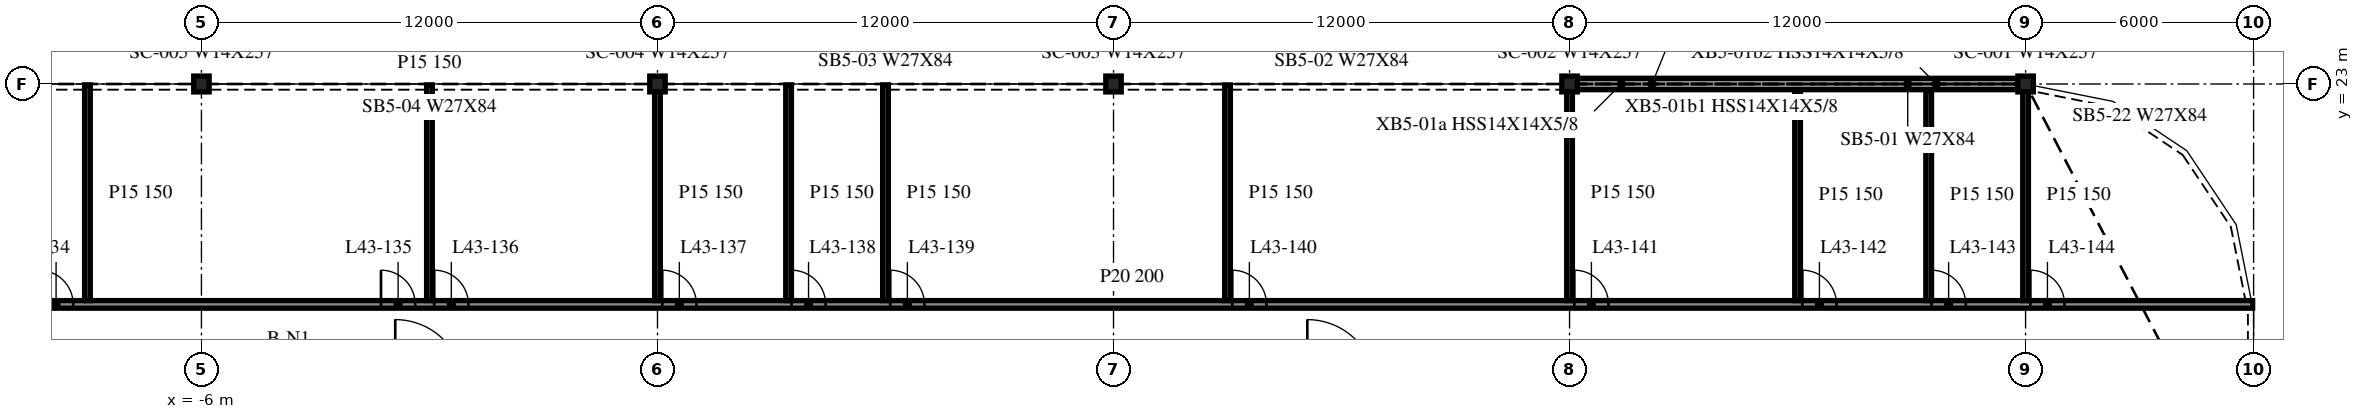
"""IFC4 building model, lengths in metres.
Left out: names, types, materials, properties, quantities, classifications, styles, units other than length and angle.
Written with IfcOpenShell. Run it as: python <this file> out.ifc"""

import sys

from ifc_helpers import new_model, si_unit, direction, frame, frame_2d, origin, origin_2d, place, context, subcontext, project, spatial, rectangle, i_section, extrude, element, fill, save


model = new_model("IFC4")
c1 = context("Model", 3, precision=1e-05, world=origin(), true_north=direction((0.0, 1.0)))
c2 = subcontext(c1, "Body", "Model", "MODEL_VIEW")
j1 = project(units=[si_unit("LENGTHUNIT", "METRE"), si_unit("PLANEANGLEUNIT", "RADIAN")], contexts=[c1])
p1 = place(None, origin())
s1 = spatial("IfcSite", under=j1, at=p1, CompositionType="ELEMENT")
p2 = place(p1, origin())
s2 = spatial("IfcBuilding", under=s1, at=p2, CompositionType="ELEMENT")
p3 = place(p2, frame((0.0, 0.0, 182.0)))
s3 = spatial("IfcBuildingStorey", under=s2, at=p3, CompositionType="ELEMENT", Elevation=182.0)
for number, where, z_axis, x_axis in (
    (1, (42.0, 23.0, -0.34), (0.0, 0.0, 1.0), (1.0, 0.0, 0.0)),
    (2, (30.0, 23.0, -0.34), (0.0, 0.0, 1.0), (1.0, 0.0, 0.0)),
    (3, (18.0, 23.0, -0.34), (0.0, 0.0, 1.0), (1.0, 0.0, 0.0)),
    (4, (6.0, 23.0, -0.34), (0.0, 0.0, 1.0), (1.0, 0.0, 0.0)),
    (5, (-6.0, 23.0, -0.34), (0.0, 0.0, 1.0), (1.0, 0.0, 0.0)),
):
    element("IfcColumn", number, at=place(p3, frame(where, z_axis=z_axis, x_axis=x_axis)), inside=s3, PredefinedType="COLUMN", context=c2, shape_type="SweptSolid", body=[
        extrude(i_section(OverallWidth=0.406, OverallDepth=0.417, WebThickness=0.03, FlangeThickness=0.048, at=origin_2d()), origin(), (0.0, 0.0, 1.0), 3.8),
    ])
p4 = place(p3, frame((41.985, 23.0, 0.0), z_axis=(0.0, 0.0, 1.0), x_axis=(-1.0, 0.0, 0.0)))
e6 = element("IfcWall", 6, at=p4, inside=s3, PredefinedType="NOTDEFINED", context=c2, shape_type="SweptSolid", body=[
    extrude(rectangle(XDim=11.97, YDim=0.3, at=frame_2d((5.985, 0.0))), origin(), (0.0, 0.0, 1.0), 2.782),
])
p5 = place(p3, frame((-47.975, 17.2, 0.0), z_axis=(0.0, 0.0, 1.0), x_axis=(1.0, 0.0, 0.0)))
e7 = element("IfcWall", 7, at=p5, inside=s3, PredefinedType="PARTITIONING", context=c2, shape_type="SweptSolid", body=[
    extrude(rectangle(XDim=95.95, YDim=0.2, at=frame_2d((47.975, 0.0))), origin(), (0.0, 0.0, 1.0), 3.46),
])
p6 = place(p5, frame((7.7, 0.0, 0.0)))
e8 = element("IfcOpeningElement", 8, at=p6, cuts=e7, PredefinedType="OPENING", context=c2, shape_type="SweptSolid", body=[
    extrude(rectangle(XDim=0.9, YDim=2.1, at=frame_2d((0.45, 1.05))), frame((0.0, 0.11, 0.0), z_axis=(0.0, -1.0, 0.0), x_axis=(1.0, 0.0, 0.0)), (0.0, 0.0, 1.0), 0.22),
])
p7 = place(p5, frame((16.7, 0.0, 0.0)))
e9 = element("IfcOpeningElement", 9, at=p7, cuts=e7, PredefinedType="OPENING", context=c2, shape_type="SweptSolid", body=[
    extrude(rectangle(XDim=0.9, YDim=2.1, at=frame_2d((0.45, 1.05))), frame((0.0, 0.11, 0.0), z_axis=(0.0, -1.0, 0.0), x_axis=(1.0, 0.0, 0.0)), (0.0, 0.0, 1.0), 0.22),
])
p8 = place(p5, frame((22.7, 0.0, 0.0)))
e10 = element("IfcOpeningElement", 10, at=p8, cuts=e7, PredefinedType="OPENING", context=c2, shape_type="SweptSolid", body=[
    extrude(rectangle(XDim=0.9, YDim=2.1, at=frame_2d((0.45, 1.05))), frame((0.0, 0.11, 0.0), z_axis=(0.0, -1.0, 0.0), x_axis=(1.0, 0.0, 0.0)), (0.0, 0.0, 1.0), 0.22),
])
p9 = place(p5, frame((26.1, 0.0, 0.0)))
e11 = element("IfcOpeningElement", 11, at=p9, cuts=e7, PredefinedType="OPENING", context=c2, shape_type="SweptSolid", body=[
    extrude(rectangle(XDim=0.9, YDim=2.1, at=frame_2d((0.45, 1.05))), frame((0.0, 0.11, 0.0), z_axis=(0.0, -1.0, 0.0), x_axis=(1.0, 0.0, 0.0)), (0.0, 0.0, 1.0), 0.22),
])
p10 = place(p5, frame((28.7, 0.0, 0.0)))
e12 = element("IfcOpeningElement", 12, at=p10, cuts=e7, PredefinedType="OPENING", context=c2, shape_type="SweptSolid", body=[
    extrude(rectangle(XDim=0.9, YDim=2.1, at=frame_2d((0.45, 1.05))), frame((0.0, 0.11, 0.0), z_axis=(0.0, -1.0, 0.0), x_axis=(1.0, 0.0, 0.0)), (0.0, 0.0, 1.0), 0.22),
])
p11 = place(p5, frame((37.7, 0.0, 0.0)))
e13 = element("IfcOpeningElement", 13, at=p11, cuts=e7, PredefinedType="OPENING", context=c2, shape_type="SweptSolid", body=[
    extrude(rectangle(XDim=0.9, YDim=2.1, at=frame_2d((0.45, 1.05))), frame((0.0, 0.11, 0.0), z_axis=(0.0, -1.0, 0.0), x_axis=(1.0, 0.0, 0.0)), (0.0, 0.0, 1.0), 0.22),
])
p12 = place(p5, frame((46.7, 0.0, 0.0)))
e14 = element("IfcOpeningElement", 14, at=p12, cuts=e7, PredefinedType="OPENING", context=c2, shape_type="SweptSolid", body=[
    extrude(rectangle(XDim=0.9, YDim=2.1, at=frame_2d((0.45, 1.05))), frame((0.0, 0.11, 0.0), z_axis=(0.0, -1.0, 0.0), x_axis=(1.0, 0.0, 0.0)), (0.0, 0.0, 1.0), 0.22),
])
p13 = place(p5, frame((48.1, 0.0, 0.0)))
e15 = element("IfcOpeningElement", 15, at=p13, cuts=e7, PredefinedType="OPENING", context=c2, shape_type="SweptSolid", body=[
    extrude(rectangle(XDim=0.9, YDim=2.1, at=frame_2d((0.45, 1.05))), frame((0.0, 0.11, 0.0), z_axis=(0.0, -1.0, 0.0), x_axis=(1.0, 0.0, 0.0)), (0.0, 0.0, 1.0), 0.22),
])
p14 = place(p5, frame((54.1, 0.0, 0.0)))
e16 = element("IfcOpeningElement", 16, at=p14, cuts=e7, PredefinedType="OPENING", context=c2, shape_type="SweptSolid", body=[
    extrude(rectangle(XDim=0.9, YDim=2.1, at=frame_2d((0.45, 1.05))), frame((0.0, 0.11, 0.0), z_axis=(0.0, -1.0, 0.0), x_axis=(1.0, 0.0, 0.0)), (0.0, 0.0, 1.0), 0.22),
])
p15 = place(p5, frame((57.5, 0.0, 0.0)))
e17 = element("IfcOpeningElement", 17, at=p15, cuts=e7, PredefinedType="OPENING", context=c2, shape_type="SweptSolid", body=[
    extrude(rectangle(XDim=0.9, YDim=2.1, at=frame_2d((0.45, 1.05))), frame((0.0, 0.11, 0.0), z_axis=(0.0, -1.0, 0.0), x_axis=(1.0, 0.0, 0.0)), (0.0, 0.0, 1.0), 0.22),
])
p16 = place(p5, frame((60.1, 0.0, 0.0)))
e18 = element("IfcOpeningElement", 18, at=p16, cuts=e7, PredefinedType="OPENING", context=c2, shape_type="SweptSolid", body=[
    extrude(rectangle(XDim=0.9, YDim=2.1, at=frame_2d((0.45, 1.05))), frame((0.0, 0.11, 0.0), z_axis=(0.0, -1.0, 0.0), x_axis=(1.0, 0.0, 0.0)), (0.0, 0.0, 1.0), 0.22),
])
p17 = place(p5, frame((69.1, 0.0, 0.0)))
e19 = element("IfcOpeningElement", 19, at=p17, cuts=e7, PredefinedType="OPENING", context=c2, shape_type="SweptSolid", body=[
    extrude(rectangle(XDim=0.9, YDim=2.1, at=frame_2d((0.45, 1.05))), frame((0.0, 0.11, 0.0), z_axis=(0.0, -1.0, 0.0), x_axis=(1.0, 0.0, 0.0)), (0.0, 0.0, 1.0), 0.22),
])
p18 = place(p5, frame((78.1, 0.0, 0.0)))
e20 = element("IfcOpeningElement", 20, at=p18, cuts=e7, PredefinedType="OPENING", context=c2, shape_type="SweptSolid", body=[
    extrude(rectangle(XDim=0.9, YDim=2.1, at=frame_2d((0.45, 1.05))), frame((0.0, 0.11, 0.0), z_axis=(0.0, -1.0, 0.0), x_axis=(1.0, 0.0, 0.0)), (0.0, 0.0, 1.0), 0.22),
])
p19 = place(p5, frame((84.1, 0.0, 0.0)))
e21 = element("IfcOpeningElement", 21, at=p19, cuts=e7, PredefinedType="OPENING", context=c2, shape_type="SweptSolid", body=[
    extrude(rectangle(XDim=0.9, YDim=2.1, at=frame_2d((0.45, 1.05))), frame((0.0, 0.11, 0.0), z_axis=(0.0, -1.0, 0.0), x_axis=(1.0, 0.0, 0.0)), (0.0, 0.0, 1.0), 0.22),
])
p20 = place(p5, frame((87.5, 0.0, 0.0)))
e22 = element("IfcOpeningElement", 22, at=p20, cuts=e7, PredefinedType="OPENING", context=c2, shape_type="SweptSolid", body=[
    extrude(rectangle(XDim=0.9, YDim=2.1, at=frame_2d((0.45, 1.05))), frame((0.0, 0.11, 0.0), z_axis=(0.0, -1.0, 0.0), x_axis=(1.0, 0.0, 0.0)), (0.0, 0.0, 1.0), 0.22),
])
p21 = place(p5, frame((90.1, 0.0, 0.0)))
e23 = element("IfcOpeningElement", 23, at=p21, cuts=e7, PredefinedType="OPENING", context=c2, shape_type="SweptSolid", body=[
    extrude(rectangle(XDim=0.9, YDim=2.1, at=frame_2d((0.45, 1.05))), frame((0.0, 0.11, 0.0), z_axis=(0.0, -1.0, 0.0), x_axis=(1.0, 0.0, 0.0)), (0.0, 0.0, 1.0), 0.22),
])
for number, where, z_axis, x_axis in (
    (24, (-9.0, 17.3, 0.0), (0.0, 0.0, 1.0), (0.0, 1.0, 0.0)),
    (25, (0.0, 17.3, 0.0), (0.0, 0.0, 1.0), (0.0, 1.0, 0.0)),
    (26, (6.0, 17.3, 0.0), (0.0, 0.0, 1.0), (0.0, 1.0, 0.0)),
    (27, (9.45, 17.3, 0.0), (0.0, 0.0, 1.0), (0.0, 1.0, 0.0)),
    (28, (12.0, 17.3, 0.0), (0.0, 0.0, 1.0), (0.0, 1.0, 0.0)),
    (29, (21.0, 17.3, 0.0), (0.0, 0.0, 1.0), (0.0, 1.0, 0.0)),
    (30, (30.0, 17.3, 0.0), (0.0, 0.0, 1.0), (0.0, 1.0, 0.0)),
):
    element("IfcWall", number, at=place(p3, frame(where, z_axis=z_axis, x_axis=x_axis)), inside=s3, PredefinedType="PARTITIONING", context=c2, shape_type="SweptSolid", body=[
        extrude(rectangle(XDim=5.675, YDim=0.15, at=frame_2d((2.837, 0.0))), origin(), (0.0, 0.0, 1.0), 3.46),
    ])
for number, where, z_axis, x_axis in (
    (31, (36.0, 17.3, 0.0), (0.0, 0.0, 1.0), (0.0, 1.0, 0.0)),
    (32, (39.45, 17.3, 0.0), (0.0, 0.0, 1.0), (0.0, 1.0, 0.0)),
):
    element("IfcWall", number, at=place(p3, frame(where, z_axis=z_axis, x_axis=x_axis)), inside=s3, PredefinedType="PARTITIONING", context=c2, shape_type="SweptSolid", body=[
        extrude(rectangle(XDim=5.55, YDim=0.15, at=frame_2d((2.775, 0.0))), origin(), (0.0, 0.0, 1.0), 3.46),
    ])
p22 = place(p3, frame((42.0, 17.3, 0.0), z_axis=(0.0, 0.0, 1.0), x_axis=(0.0, 1.0, 0.0)))
e33 = element("IfcWall", 33, at=p22, inside=s3, PredefinedType="PARTITIONING", context=c2, shape_type="SweptSolid", body=[
    extrude(rectangle(XDim=5.547, YDim=0.15, at=frame_2d((2.773, 0.0))), origin(), (0.0, 0.0, 1.0), 3.46),
])
p23 = place(p11, origin())
e34 = element("IfcDoor", 34, at=p23, inside=s3, OperationType="SINGLE_SWING_LEFT", PredefinedType="DOOR", context=c2, shape_type="SweptSolid", body=[
    extrude(rectangle(XDim=0.9, YDim=2.1, at=frame_2d((0.45, 1.05))), frame((0.0, 0.025, 0.0), z_axis=(0.0, -1.0, 0.0), x_axis=(1.0, 0.0, 0.0)), (0.0, 0.0, 1.0), 0.05),
])
fill(e13, e34)
p24 = place(p12, origin())
e35 = element("IfcDoor", 35, at=p24, inside=s3, OperationType="SINGLE_SWING_LEFT", PredefinedType="DOOR", context=c2, shape_type="SweptSolid", body=[
    extrude(rectangle(XDim=0.9, YDim=2.1, at=frame_2d((0.45, 1.05))), frame((0.0, 0.025, 0.0), z_axis=(0.0, -1.0, 0.0), x_axis=(1.0, 0.0, 0.0)), (0.0, 0.0, 1.0), 0.05),
])
fill(e14, e35)
p25 = place(p13, origin())
e36 = element("IfcDoor", 36, at=p25, inside=s3, OperationType="SINGLE_SWING_RIGHT", PredefinedType="DOOR", context=c2, shape_type="SweptSolid", body=[
    extrude(rectangle(XDim=0.9, YDim=2.1, at=frame_2d((0.45, 1.05))), frame((0.0, 0.025, 0.0), z_axis=(0.0, -1.0, 0.0), x_axis=(1.0, 0.0, 0.0)), (0.0, 0.0, 1.0), 0.05),
])
fill(e15, e36)
p26 = place(p14, origin())
e37 = element("IfcDoor", 37, at=p26, inside=s3, OperationType="SINGLE_SWING_RIGHT", PredefinedType="DOOR", context=c2, shape_type="SweptSolid", body=[
    extrude(rectangle(XDim=0.9, YDim=2.1, at=frame_2d((0.45, 1.05))), frame((0.0, 0.025, 0.0), z_axis=(0.0, -1.0, 0.0), x_axis=(1.0, 0.0, 0.0)), (0.0, 0.0, 1.0), 0.05),
])
fill(e16, e37)
p27 = place(p15, origin())
e38 = element("IfcDoor", 38, at=p27, inside=s3, OperationType="SINGLE_SWING_RIGHT", PredefinedType="DOOR", context=c2, shape_type="SweptSolid", body=[
    extrude(rectangle(XDim=0.9, YDim=2.1, at=frame_2d((0.45, 1.05))), frame((0.0, 0.025, 0.0), z_axis=(0.0, -1.0, 0.0), x_axis=(1.0, 0.0, 0.0)), (0.0, 0.0, 1.0), 0.05),
])
fill(e17, e38)
p28 = place(p16, origin())
e39 = element("IfcDoor", 39, at=p28, inside=s3, OperationType="SINGLE_SWING_RIGHT", PredefinedType="DOOR", context=c2, shape_type="SweptSolid", body=[
    extrude(rectangle(XDim=0.9, YDim=2.1, at=frame_2d((0.45, 1.05))), frame((0.0, 0.025, 0.0), z_axis=(0.0, -1.0, 0.0), x_axis=(1.0, 0.0, 0.0)), (0.0, 0.0, 1.0), 0.05),
])
fill(e18, e39)
p29 = place(p17, origin())
e40 = element("IfcDoor", 40, at=p29, inside=s3, OperationType="SINGLE_SWING_RIGHT", PredefinedType="DOOR", context=c2, shape_type="SweptSolid", body=[
    extrude(rectangle(XDim=0.9, YDim=2.1, at=frame_2d((0.45, 1.05))), frame((0.0, 0.025, 0.0), z_axis=(0.0, -1.0, 0.0), x_axis=(1.0, 0.0, 0.0)), (0.0, 0.0, 1.0), 0.05),
])
fill(e19, e40)
p30 = place(p18, origin())
e41 = element("IfcDoor", 41, at=p30, inside=s3, OperationType="SINGLE_SWING_RIGHT", PredefinedType="DOOR", context=c2, shape_type="SweptSolid", body=[
    extrude(rectangle(XDim=0.9, YDim=2.1, at=frame_2d((0.45, 1.05))), frame((0.0, 0.025, 0.0), z_axis=(0.0, -1.0, 0.0), x_axis=(1.0, 0.0, 0.0)), (0.0, 0.0, 1.0), 0.05),
])
fill(e20, e41)
p31 = place(p19, origin())
e42 = element("IfcDoor", 42, at=p31, inside=s3, OperationType="SINGLE_SWING_RIGHT", PredefinedType="DOOR", context=c2, shape_type="SweptSolid", body=[
    extrude(rectangle(XDim=0.9, YDim=2.1, at=frame_2d((0.45, 1.05))), frame((0.0, 0.025, 0.0), z_axis=(0.0, -1.0, 0.0), x_axis=(1.0, 0.0, 0.0)), (0.0, 0.0, 1.0), 0.05),
])
fill(e21, e42)
p32 = place(p20, origin())
e43 = element("IfcDoor", 43, at=p32, inside=s3, OperationType="SINGLE_SWING_RIGHT", PredefinedType="DOOR", context=c2, shape_type="SweptSolid", body=[
    extrude(rectangle(XDim=0.9, YDim=2.1, at=frame_2d((0.45, 1.05))), frame((0.0, 0.025, 0.0), z_axis=(0.0, -1.0, 0.0), x_axis=(1.0, 0.0, 0.0)), (0.0, 0.0, 1.0), 0.05),
])
fill(e22, e43)
p33 = place(p21, origin())
e44 = element("IfcDoor", 44, at=p33, inside=s3, OperationType="SINGLE_SWING_RIGHT", PredefinedType="DOOR", context=c2, shape_type="SweptSolid", body=[
    extrude(rectangle(XDim=0.9, YDim=2.1, at=frame_2d((0.45, 1.05))), frame((0.0, 0.025, 0.0), z_axis=(0.0, -1.0, 0.0), x_axis=(1.0, 0.0, 0.0)), (0.0, 0.0, 1.0), 0.05),
])
fill(e23, e44)
save(model, sys.argv[1])
